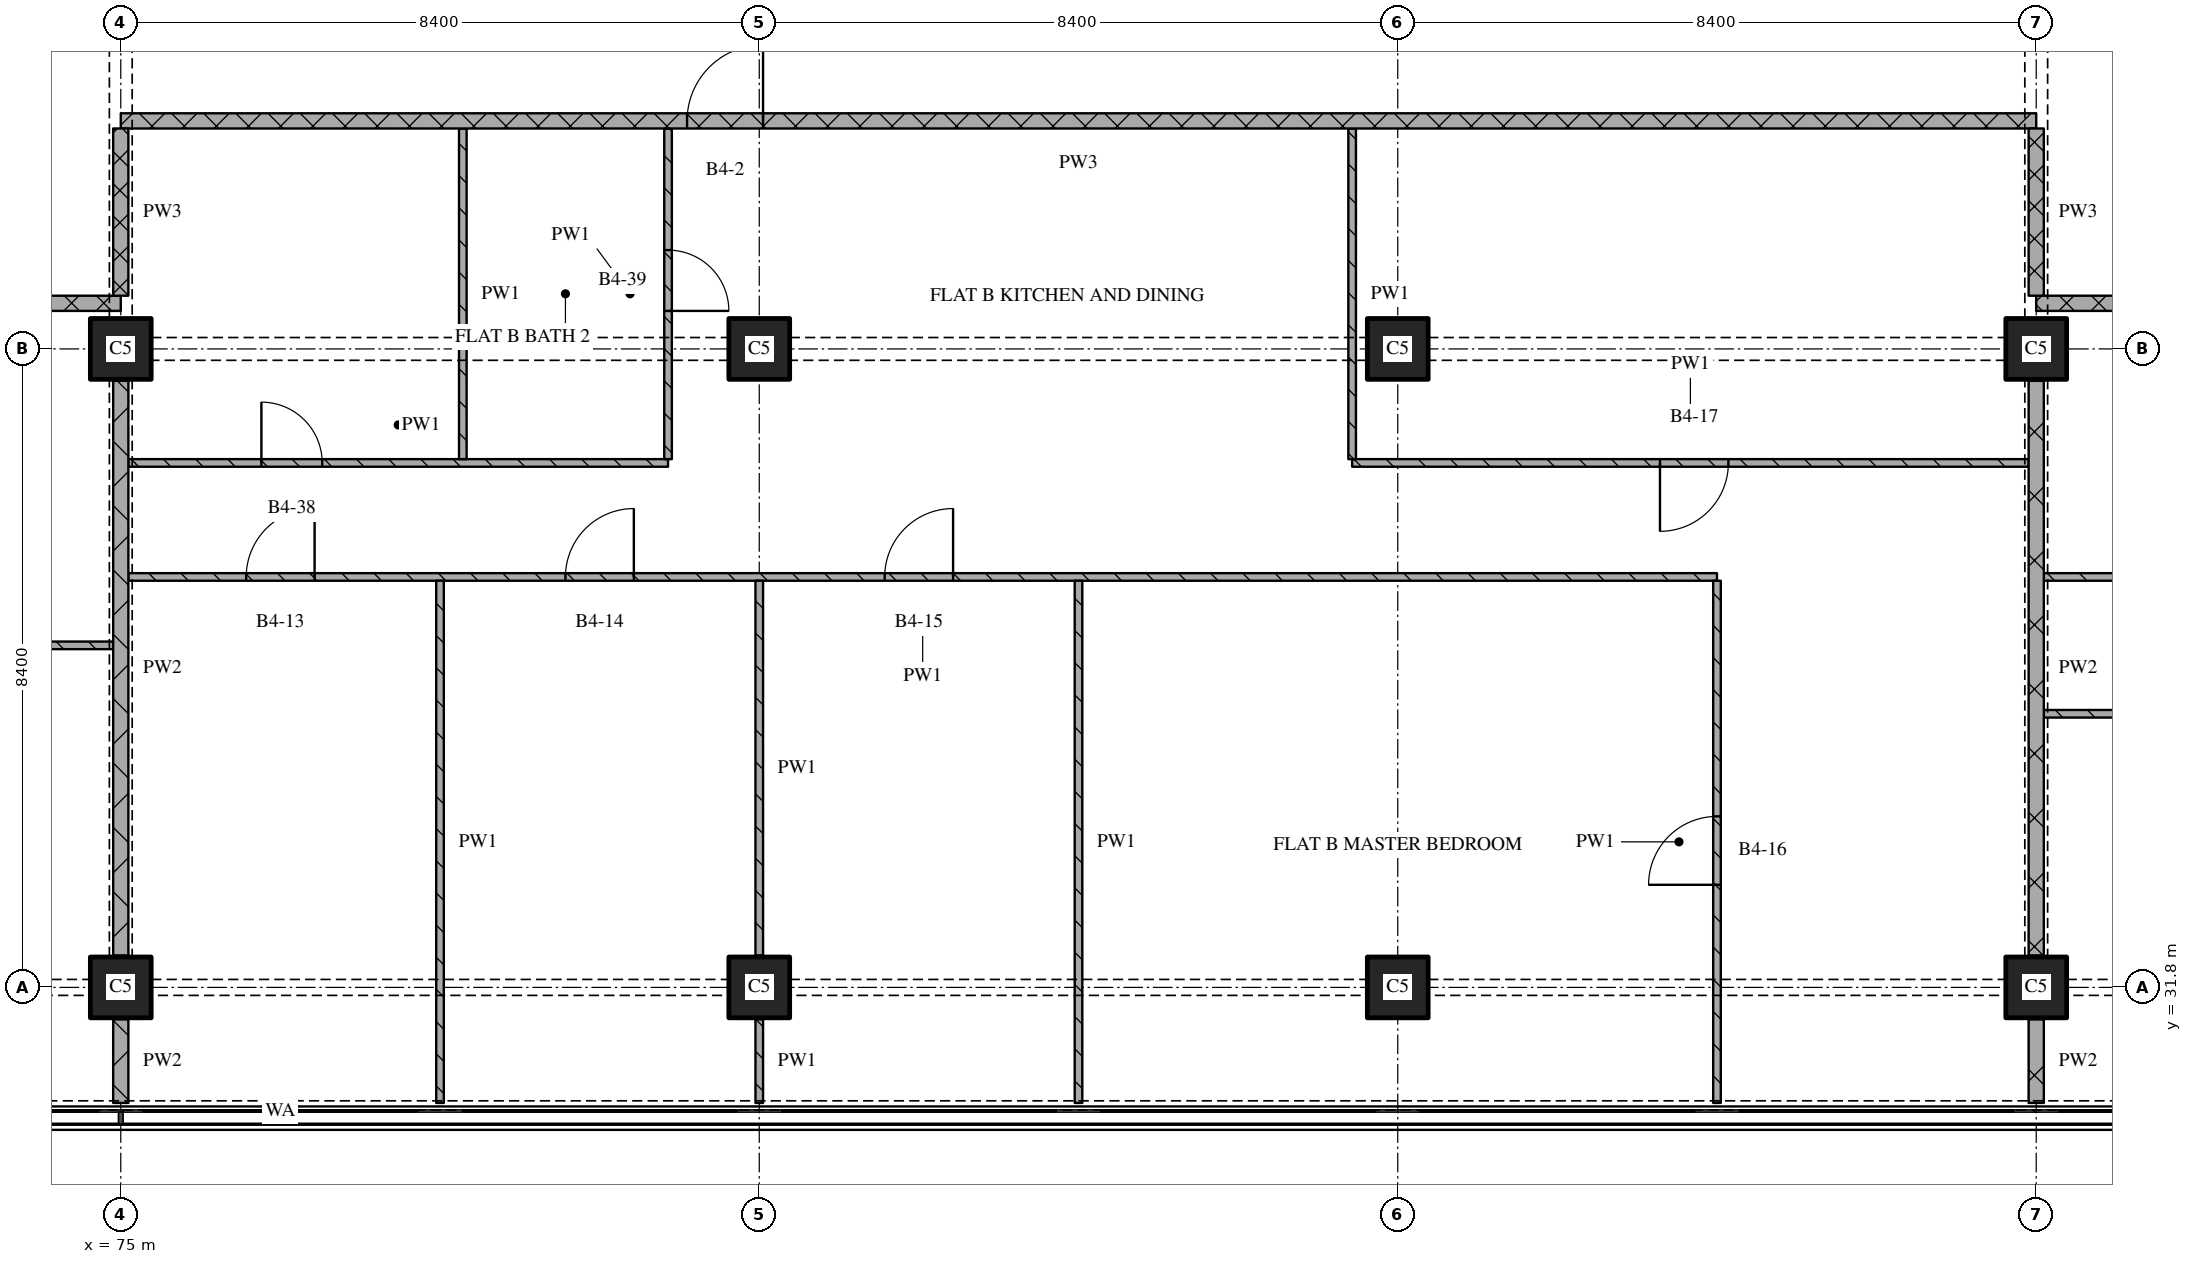
"""IFC4 building model, lengths in metres.
Left out: names, types, materials, properties, quantities, classifications, styles, units other than length and angle.
Written with IfcOpenShell. Run it as: python <this file> out.ifc"""

import sys

from ifc_helpers import new_model, si_unit, direction, frame, frame_2d, origin, origin_2d, place, context, subcontext, project, spatial, rectangle, extrude, element, fill, save


model = new_model("IFC4")
c1 = context("Model", 3, precision=1e-05, world=origin(), true_north=direction((0.0, 1.0)))
c2 = subcontext(c1, "Body", "Model", "MODEL_VIEW")
j1 = project(units=[si_unit("LENGTHUNIT", "METRE"), si_unit("PLANEANGLEUNIT", "RADIAN")], contexts=[c1])
p1 = place(None, origin())
s1 = spatial("IfcSite", under=j1, at=p1, CompositionType="ELEMENT")
p2 = place(p1, origin())
s2 = spatial("IfcBuilding", under=s1, at=p2, CompositionType="ELEMENT")
p3 = place(p2, frame((0.0, 0.0, 127.65)))
s3 = spatial("IfcBuildingStorey", under=s2, at=p3, CompositionType="ELEMENT", Elevation=127.65)
for number, where, z_axis, x_axis in (
    (1, (75.0, 31.8, 0.0), (0.0, 0.0, 1.0), (1.0, 0.0, 0.0)),
    (2, (75.0, 40.2, 0.0), (0.0, 0.0, 1.0), (1.0, 0.0, 0.0)),
    (3, (83.4, 31.8, 0.0), (0.0, 0.0, 1.0), (1.0, 0.0, 0.0)),
    (4, (83.4, 40.2, 0.0), (0.0, 0.0, 1.0), (1.0, 0.0, 0.0)),
    (5, (91.8, 31.8, 0.0), (0.0, 0.0, 1.0), (1.0, 0.0, 0.0)),
    (6, (91.8, 40.2, 0.0), (0.0, 0.0, 1.0), (1.0, 0.0, 0.0)),
    (7, (100.2, 31.8, 0.0), (0.0, 0.0, 1.0), (1.0, 0.0, 0.0)),
    (8, (100.2, 40.2, 0.0), (0.0, 0.0, 1.0), (1.0, 0.0, 0.0)),
):
    element("IfcColumn", number, at=place(p3, frame(where, z_axis=z_axis, x_axis=x_axis)), inside=s3, PredefinedType="COLUMN", context=c2, shape_type="SweptSolid", body=[
        extrude(rectangle(XDim=0.8, YDim=0.8, at=origin_2d()), origin(), (0.0, 0.0, 1.0), 3.6),
    ])
p4 = place(p3, frame((100.3, 35.4, 0.0), z_axis=(0.0, 0.0, 1.0), x_axis=(1.0, 0.0, 0.0)))
e9 = element("IfcWall", 9, at=p4, inside=s3, PredefinedType="PARTITIONING", context=c2, shape_type="SweptSolid", body=[
    extrude(rectangle(XDim=8.3, YDim=0.1, at=frame_2d((4.15, 0.0))), origin(), (0.0, 0.0, 1.0), 3.32),
])
p5 = place(p3, frame((65.7, 36.3, 0.0), z_axis=(0.0, 0.0, 1.0), x_axis=(1.0, 0.0, 0.0)))
e10 = element("IfcWall", 10, at=p5, inside=s3, PredefinedType="PARTITIONING", context=c2, shape_type="SweptSolid", body=[
    extrude(rectangle(XDim=9.2, YDim=0.1, at=frame_2d((4.6, 0.0))), origin(), (0.0, 0.0, 1.0), 3.32),
])
p6 = place(p5, frame((6.5, 0.0, 0.0)))
e11 = element("IfcOpeningElement", 11, at=p6, cuts=e10, PredefinedType="OPENING", context=c2, shape_type="SweptSolid", body=[
    extrude(rectangle(XDim=0.8, YDim=2.1, at=frame_2d((0.4, 1.05))), frame((0.0, 0.06, 0.0), z_axis=(0.0, -1.0, 0.0), x_axis=(1.0, 0.0, 0.0)), (0.0, 0.0, 1.0), 0.12),
])
p7 = place(p3, frame((96.0, 37.2, 0.0), z_axis=(0.0, 0.0, 1.0), x_axis=(-1.0, 0.0, 0.0)))
e12 = element("IfcWall", 12, at=p7, inside=s3, PredefinedType="PARTITIONING", context=c2, shape_type="SweptSolid", body=[
    extrude(rectangle(XDim=20.9, YDim=0.1, at=frame_2d((10.45, 0.0))), origin(), (0.0, 0.0, 1.0), 3.32),
])
p8 = place(p7, frame((10.05, 0.0, 0.0)))
e13 = element("IfcOpeningElement", 13, at=p8, cuts=e12, PredefinedType="OPENING", context=c2, shape_type="SweptSolid", body=[
    extrude(rectangle(XDim=0.9, YDim=2.1, at=frame_2d((0.45, 1.05))), frame((0.0, 0.06, 0.0), z_axis=(0.0, -1.0, 0.0), x_axis=(1.0, 0.0, 0.0)), (0.0, 0.0, 1.0), 0.12),
])
p9 = place(p7, frame((14.25, 0.0, 0.0)))
e14 = element("IfcOpeningElement", 14, at=p9, cuts=e12, PredefinedType="OPENING", context=c2, shape_type="SweptSolid", body=[
    extrude(rectangle(XDim=0.9, YDim=2.1, at=frame_2d((0.45, 1.05))), frame((0.0, 0.06, 0.0), z_axis=(0.0, -1.0, 0.0), x_axis=(1.0, 0.0, 0.0)), (0.0, 0.0, 1.0), 0.12),
])
p10 = place(p7, frame((18.45, 0.0, 0.0)))
e15 = element("IfcOpeningElement", 15, at=p10, cuts=e12, PredefinedType="OPENING", context=c2, shape_type="SweptSolid", body=[
    extrude(rectangle(XDim=0.9, YDim=2.1, at=frame_2d((0.45, 1.05))), frame((0.0, 0.06, 0.0), z_axis=(0.0, -1.0, 0.0), x_axis=(1.0, 0.0, 0.0)), (0.0, 0.0, 1.0), 0.12),
])
p11 = place(p3, frame((100.3, 37.2, 0.0), z_axis=(0.0, 0.0, 1.0), x_axis=(1.0, 0.0, 0.0)))
e16 = element("IfcWall", 16, at=p11, inside=s3, PredefinedType="PARTITIONING", context=c2, shape_type="SweptSolid", body=[
    extrude(rectangle(XDim=11.0, YDim=0.1, at=frame_2d((5.5, 0.0))), origin(), (0.0, 0.0, 1.0), 3.32),
])
p12 = place(p11, frame((1.75, 0.0, 0.0)))
e17 = element("IfcOpeningElement", 17, at=p12, cuts=e16, PredefinedType="OPENING", context=c2, shape_type="SweptSolid", body=[
    extrude(rectangle(XDim=0.8, YDim=2.1, at=frame_2d((0.4, 1.05))), frame((0.0, 0.06, 0.0), z_axis=(0.0, -1.0, 0.0), x_axis=(1.0, 0.0, 0.0)), (0.0, 0.0, 1.0), 0.12),
])
p13 = place(p11, frame((6.25, 0.0, 0.0)))
e18 = element("IfcOpeningElement", 18, at=p13, cuts=e16, PredefinedType="OPENING", context=c2, shape_type="SweptSolid", body=[
    extrude(rectangle(XDim=0.8, YDim=2.1, at=frame_2d((0.4, 1.05))), frame((0.0, 0.06, 0.0), z_axis=(0.0, -1.0, 0.0), x_axis=(1.0, 0.0, 0.0)), (0.0, 0.0, 1.0), 0.12),
])
p14 = place(p3, frame((75.1, 38.7, 0.0), z_axis=(0.0, 0.0, 1.0), x_axis=(1.0, 0.0, 0.0)))
e19 = element("IfcWall", 19, at=p14, inside=s3, PredefinedType="PARTITIONING", context=c2, shape_type="SweptSolid", body=[
    extrude(rectangle(XDim=7.1, YDim=0.1, at=frame_2d((3.55, 0.0))), origin(), (0.0, 0.0, 1.0), 3.32),
])
p15 = place(p14, frame((1.75, 0.0, 0.0)))
e20 = element("IfcOpeningElement", 20, at=p15, cuts=e19, PredefinedType="OPENING", context=c2, shape_type="SweptSolid", body=[
    extrude(rectangle(XDim=0.8, YDim=2.1, at=frame_2d((0.4, 1.05))), frame((0.0, 0.06, 0.0), z_axis=(0.0, -1.0, 0.0), x_axis=(1.0, 0.0, 0.0)), (0.0, 0.0, 1.0), 0.12),
])
p16 = place(p3, frame((91.2, 38.7, 0.0), z_axis=(0.0, 0.0, 1.0), x_axis=(1.0, 0.0, 0.0)))
e21 = element("IfcWall", 21, at=p16, inside=s3, PredefinedType="PARTITIONING", context=c2, shape_type="SweptSolid", body=[
    extrude(rectangle(XDim=8.9, YDim=0.1, at=frame_2d((4.45, 0.0))), origin(), (0.0, 0.0, 1.0), 3.32),
])
p17 = place(p16, frame((4.05, 0.0, 0.0)))
e22 = element("IfcOpeningElement", 22, at=p17, cuts=e21, PredefinedType="OPENING", context=c2, shape_type="SweptSolid", body=[
    extrude(rectangle(XDim=0.9, YDim=2.1, at=frame_2d((0.45, 1.05))), frame((0.0, 0.06, 0.0), z_axis=(0.0, -1.0, 0.0), x_axis=(1.0, 0.0, 0.0)), (0.0, 0.0, 1.0), 0.12),
])
p18 = place(p3, frame((75.0, 40.8, 0.0), z_axis=(0.0, 0.0, 1.0), x_axis=(-1.0, 0.0, 0.0)))
e23 = element("IfcWall", 23, at=p18, inside=s3, PredefinedType="PARTITIONING", context=c2, shape_type="SweptSolid", body=[
    extrude(rectangle(XDim=24.18, YDim=0.2, at=frame_2d((12.09, 0.0))), origin(), (0.0, 0.0, 1.0), 3.32),
])
p19 = place(p18, frame((9.55, 0.0, 0.0)))
e24 = element("IfcOpeningElement", 24, at=p19, cuts=e23, PredefinedType="OPENING", context=c2, shape_type="SweptSolid", body=[
    extrude(rectangle(XDim=1.0, YDim=2.1, at=frame_2d((0.5, 1.05))), frame((0.0, 0.11, 0.0), z_axis=(0.0, -1.0, 0.0), x_axis=(1.0, 0.0, 0.0)), (0.0, 0.0, 1.0), 0.22),
])
p20 = place(p3, frame((124.38, 40.8, 0.0), z_axis=(0.0, 0.0, 1.0), x_axis=(-1.0, 0.0, 0.0)))
e25 = element("IfcWall", 25, at=p20, inside=s3, PredefinedType="PARTITIONING", context=c2, shape_type="SweptSolid", body=[
    extrude(rectangle(XDim=24.18, YDim=0.2, at=frame_2d((12.09, 0.0))), origin(), (0.0, 0.0, 1.0), 3.32),
])
p21 = place(p20, frame((11.83, 0.0, 0.0)))
e26 = element("IfcOpeningElement", 26, at=p21, cuts=e25, PredefinedType="OPENING", context=c2, shape_type="SweptSolid", body=[
    extrude(rectangle(XDim=1.0, YDim=2.1, at=frame_2d((0.5, 1.05))), frame((0.0, 0.11, 0.0), z_axis=(0.0, -1.0, 0.0), x_axis=(1.0, 0.0, 0.0)), (0.0, 0.0, 1.0), 0.22),
])
p22 = place(p3, frame((100.2, 43.2, 0.0), z_axis=(0.0, 0.0, 1.0), x_axis=(-1.0, 0.0, 0.0)))
e27 = element("IfcWall", 27, at=p22, inside=s3, PredefinedType="PARTITIONING", context=c2, shape_type="SweptSolid", body=[
    extrude(rectangle(XDim=25.2, YDim=0.2, at=frame_2d((12.6, 0.0))), origin(), (0.0, 0.0, 1.0), 3.32),
])
p23 = place(p22, frame((16.75, 0.0, 0.0)))
e28 = element("IfcOpeningElement", 28, at=p23, cuts=e27, PredefinedType="OPENING", context=c2, shape_type="SweptSolid", body=[
    extrude(rectangle(XDim=1.0, YDim=2.1, at=frame_2d((0.5, 1.05))), frame((0.0, 0.11, 0.0), z_axis=(0.0, -1.0, 0.0), x_axis=(1.0, 0.0, 0.0)), (0.0, 0.0, 1.0), 0.22),
])
p24 = place(p3, frame((75.0, 43.1, 0.0), z_axis=(0.0, 0.0, 1.0), x_axis=(0.0, -1.0, 0.0)))
e29 = element("IfcWall", 29, at=p24, inside=s3, PredefinedType="PARTITIONING", context=c2, shape_type="SweptSolid", body=[
    extrude(rectangle(XDim=2.2, YDim=0.2, at=frame_2d((1.1, 0.0))), origin(), (0.0, 0.0, 1.0), 2.43),
])
p25 = place(p3, frame((75.0, 31.38, 0.0), z_axis=(0.0, 0.0, 1.0), x_axis=(0.0, -1.0, 0.0)))
e30 = element("IfcWall", 30, at=p25, inside=s3, PredefinedType="PARTITIONING", context=c2, shape_type="SweptSolid", body=[
    extrude(rectangle(XDim=1.1, YDim=0.2, at=frame_2d((0.55, 0.0))), origin(), (0.0, 0.0, 1.0), 3.32),
])
p26 = place(p3, frame((75.0, 39.78, 0.0), z_axis=(0.0, 0.0, 1.0), x_axis=(0.0, -1.0, 0.0)))
e31 = element("IfcWall", 31, at=p26, inside=s3, PredefinedType="PARTITIONING", context=c2, shape_type="SweptSolid", body=[
    extrude(rectangle(XDim=7.56, YDim=0.2, at=frame_2d((3.78, 0.0))), origin(), (0.0, 0.0, 1.0), 2.83),
])
p27 = place(p3, frame((79.2, 37.15, 0.0), z_axis=(0.0, 0.0, 1.0), x_axis=(0.0, -1.0, 0.0)))
e32 = element("IfcWall", 32, at=p27, inside=s3, PredefinedType="PARTITIONING", context=c2, shape_type="SweptSolid", body=[
    extrude(rectangle(XDim=6.87, YDim=0.1, at=frame_2d((3.435, 0.0))), origin(), (0.0, 0.0, 1.0), 3.32),
])
p28 = place(p3, frame((79.5, 43.1, 0.0), z_axis=(0.0, 0.0, 1.0), x_axis=(0.0, -1.0, 0.0)))
e33 = element("IfcWall", 33, at=p28, inside=s3, PredefinedType="PARTITIONING", context=c2, shape_type="SweptSolid", body=[
    extrude(rectangle(XDim=4.35, YDim=0.1, at=frame_2d((2.175, 0.0))), origin(), (0.0, 0.0, 1.0), 3.32),
])
p29 = place(p3, frame((82.2, 38.75, 0.0), z_axis=(0.0, 0.0, 1.0), x_axis=(0.0, 1.0, 0.0)))
e34 = element("IfcWall", 34, at=p29, inside=s3, PredefinedType="PARTITIONING", context=c2, shape_type="SweptSolid", body=[
    extrude(rectangle(XDim=4.35, YDim=0.1, at=frame_2d((2.175, 0.0))), origin(), (0.0, 0.0, 1.0), 3.32),
])
p30 = place(p29, frame((1.95, 0.0, 0.0)))
e35 = element("IfcOpeningElement", 35, at=p30, cuts=e34, PredefinedType="OPENING", context=c2, shape_type="SweptSolid", body=[
    extrude(rectangle(XDim=0.8, YDim=2.1, at=frame_2d((0.4, 1.05))), frame((0.0, 0.06, 0.0), z_axis=(0.0, -1.0, 0.0), x_axis=(1.0, 0.0, 0.0)), (0.0, 0.0, 1.0), 0.12),
])
p31 = place(p3, frame((83.4, 31.38, 0.0), z_axis=(0.0, 0.0, 1.0), x_axis=(0.0, -1.0, 0.0)))
e36 = element("IfcWall", 36, at=p31, inside=s3, PredefinedType="PARTITIONING", context=c2, shape_type="SweptSolid", body=[
    extrude(rectangle(XDim=1.1, YDim=0.1, at=frame_2d((0.55, 0.0))), origin(), (0.0, 0.0, 1.0), 3.32),
])
p32 = place(p3, frame((83.4, 37.15, 0.0), z_axis=(0.0, 0.0, 1.0), x_axis=(0.0, -1.0, 0.0)))
e37 = element("IfcWall", 37, at=p32, inside=s3, PredefinedType="PARTITIONING", context=c2, shape_type="SweptSolid", body=[
    extrude(rectangle(XDim=4.93, YDim=0.1, at=frame_2d((2.465, 0.0))), origin(), (0.0, 0.0, 1.0), 3.32),
])
p33 = place(p3, frame((87.6, 37.15, 0.0), z_axis=(0.0, 0.0, 1.0), x_axis=(0.0, -1.0, 0.0)))
e38 = element("IfcWall", 38, at=p33, inside=s3, PredefinedType="PARTITIONING", context=c2, shape_type="SweptSolid", body=[
    extrude(rectangle(XDim=6.87, YDim=0.1, at=frame_2d((3.435, 0.0))), origin(), (0.0, 0.0, 1.0), 3.32),
])
p34 = place(p3, frame((91.2, 43.1, 0.0), z_axis=(0.0, 0.0, 1.0), x_axis=(0.0, -1.0, 0.0)))
e39 = element("IfcWall", 39, at=p34, inside=s3, PredefinedType="PARTITIONING", context=c2, shape_type="SweptSolid", body=[
    extrude(rectangle(XDim=4.35, YDim=0.1, at=frame_2d((2.175, 0.0))), origin(), (0.0, 0.0, 1.0), 3.32),
])
p35 = place(p3, frame((96.0, 30.28, 0.0), z_axis=(0.0, 0.0, 1.0), x_axis=(0.0, 1.0, 0.0)))
e40 = element("IfcWall", 40, at=p35, inside=s3, PredefinedType="PARTITIONING", context=c2, shape_type="SweptSolid", body=[
    extrude(rectangle(XDim=6.87, YDim=0.1, at=frame_2d((3.435, 0.0))), origin(), (0.0, 0.0, 1.0), 3.32),
])
p36 = place(p35, frame((2.87, 0.0, 0.0)))
e41 = element("IfcOpeningElement", 41, at=p36, cuts=e40, PredefinedType="OPENING", context=c2, shape_type="SweptSolid", body=[
    extrude(rectangle(XDim=0.9, YDim=2.1, at=frame_2d((0.45, 1.05))), frame((0.0, 0.06, 0.0), z_axis=(0.0, -1.0, 0.0), x_axis=(1.0, 0.0, 0.0)), (0.0, 0.0, 1.0), 0.12),
])
p37 = place(p3, frame((100.2, 43.1, 0.0), z_axis=(0.0, 0.0, 1.0), x_axis=(0.0, -1.0, 0.0)))
e42 = element("IfcWall", 42, at=p37, inside=s3, PredefinedType="PARTITIONING", context=c2, shape_type="SweptSolid", body=[
    extrude(rectangle(XDim=2.2, YDim=0.2, at=frame_2d((1.1, 0.0))), origin(), (0.0, 0.0, 1.0), 2.43),
])
p38 = place(p3, frame((100.2, 31.38, 0.0), z_axis=(0.0, 0.0, 1.0), x_axis=(0.0, -1.0, 0.0)))
e43 = element("IfcWall", 43, at=p38, inside=s3, PredefinedType="PARTITIONING", context=c2, shape_type="SweptSolid", body=[
    extrude(rectangle(XDim=1.1, YDim=0.2, at=frame_2d((0.55, 0.0))), origin(), (0.0, 0.0, 1.0), 3.32),
])
p39 = place(p3, frame((100.2, 39.78, 0.0), z_axis=(0.0, 0.0, 1.0), x_axis=(0.0, -1.0, 0.0)))
e44 = element("IfcWall", 44, at=p39, inside=s3, PredefinedType="PARTITIONING", context=c2, shape_type="SweptSolid", body=[
    extrude(rectangle(XDim=7.56, YDim=0.2, at=frame_2d((3.78, 0.0))), origin(), (0.0, 0.0, 1.0), 2.83),
])
p40 = place(p8, origin())
e45 = element("IfcDoor", 45, at=p40, inside=s3, OperationType="SINGLE_SWING_RIGHT", PredefinedType="DOOR", context=c2, shape_type="SweptSolid", body=[
    extrude(rectangle(XDim=0.9, YDim=2.1, at=frame_2d((0.45, 1.05))), frame((0.0, 0.025, 0.0), z_axis=(0.0, -1.0, 0.0), x_axis=(1.0, 0.0, 0.0)), (0.0, 0.0, 1.0), 0.05),
])
fill(e13, e45)
p41 = place(p9, origin())
e46 = element("IfcDoor", 46, at=p41, inside=s3, OperationType="SINGLE_SWING_RIGHT", PredefinedType="DOOR", context=c2, shape_type="SweptSolid", body=[
    extrude(rectangle(XDim=0.9, YDim=2.1, at=frame_2d((0.45, 1.05))), frame((0.0, 0.025, 0.0), z_axis=(0.0, -1.0, 0.0), x_axis=(1.0, 0.0, 0.0)), (0.0, 0.0, 1.0), 0.05),
])
fill(e14, e46)
p42 = place(p10, origin())
e47 = element("IfcDoor", 47, at=p42, inside=s3, OperationType="SINGLE_SWING_RIGHT", PredefinedType="DOOR", context=c2, shape_type="SweptSolid", body=[
    extrude(rectangle(XDim=0.9, YDim=2.1, at=frame_2d((0.45, 1.05))), frame((0.0, 0.025, 0.0), z_axis=(0.0, -1.0, 0.0), x_axis=(1.0, 0.0, 0.0)), (0.0, 0.0, 1.0), 0.05),
])
fill(e15, e47)
p43 = place(p15, origin())
e48 = element("IfcDoor", 48, at=p43, inside=s3, OperationType="SINGLE_SWING_LEFT", PredefinedType="DOOR", context=c2, shape_type="SweptSolid", body=[
    extrude(rectangle(XDim=0.8, YDim=2.1, at=frame_2d((0.4, 1.05))), frame((0.0, 0.025, 0.0), z_axis=(0.0, -1.0, 0.0), x_axis=(1.0, 0.0, 0.0)), (0.0, 0.0, 1.0), 0.05),
])
fill(e20, e48)
p44 = place(p17, origin())
e49 = element("IfcDoor", 49, at=p44, inside=s3, OperationType="SINGLE_SWING_RIGHT", PredefinedType="DOOR", context=c2, shape_type="SweptSolid", body=[
    extrude(rectangle(XDim=0.9, YDim=2.1, at=frame_2d((0.45, 1.05))), frame((0.0, 0.025, 0.0), z_axis=(0.0, -1.0, 0.0), x_axis=(1.0, 0.0, 0.0)), (0.0, 0.0, 1.0), 0.05),
])
fill(e22, e49)
p45 = place(p23, origin())
e50 = element("IfcDoor", 50, at=p45, inside=s3, OperationType="SINGLE_SWING_RIGHT", PredefinedType="DOOR", context=c2, shape_type="SweptSolid", body=[
    extrude(rectangle(XDim=1.0, YDim=2.1, at=frame_2d((0.5, 1.05))), frame((0.0, 0.025, 0.0), z_axis=(0.0, -1.0, 0.0), x_axis=(1.0, 0.0, 0.0)), (0.0, 0.0, 1.0), 0.05),
])
fill(e28, e50)
p46 = place(p30, origin())
e51 = element("IfcDoor", 51, at=p46, inside=s3, OperationType="SINGLE_SWING_RIGHT", PredefinedType="DOOR", context=c2, shape_type="SweptSolid", body=[
    extrude(rectangle(XDim=0.8, YDim=2.1, at=frame_2d((0.4, 1.05))), frame((0.0, 0.025, 0.0), z_axis=(0.0, -1.0, 0.0), x_axis=(1.0, 0.0, 0.0)), (0.0, 0.0, 1.0), 0.05),
])
fill(e35, e51)
p47 = place(p36, origin())
e52 = element("IfcDoor", 52, at=p47, inside=s3, OperationType="SINGLE_SWING_LEFT", PredefinedType="DOOR", context=c2, shape_type="SweptSolid", body=[
    extrude(rectangle(XDim=0.9, YDim=2.1, at=frame_2d((0.45, 1.05))), frame((0.0, 0.025, 0.0), z_axis=(0.0, -1.0, 0.0), x_axis=(1.0, 0.0, 0.0)), (0.0, 0.0, 1.0), 0.05),
])
fill(e41, e52)
save(model, sys.argv[1])
